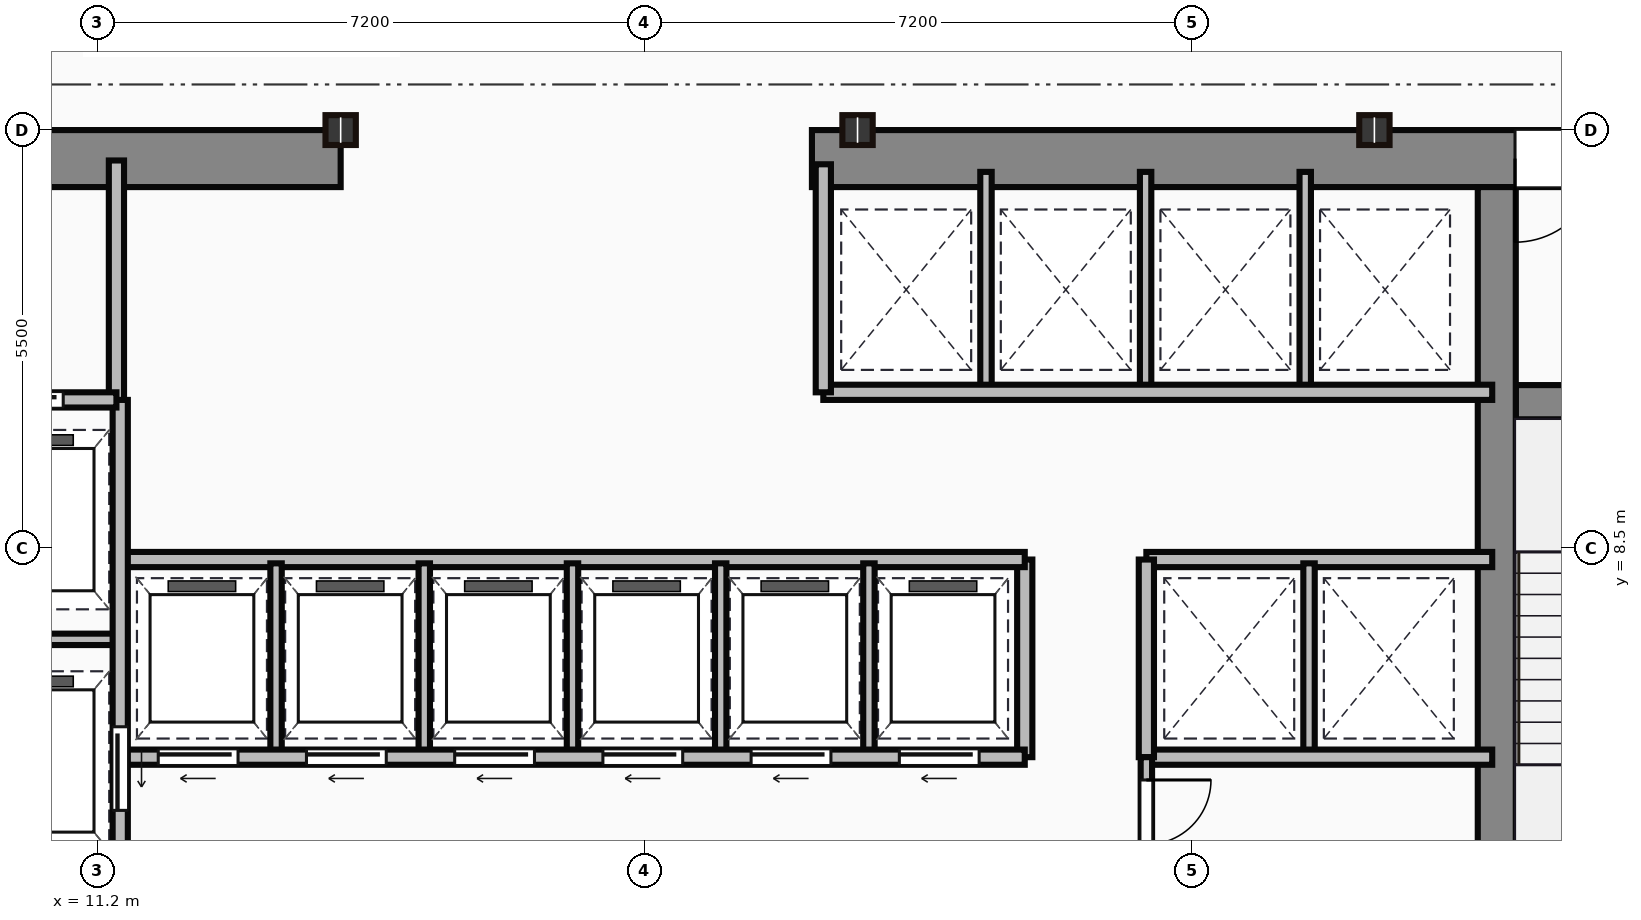
"""IFC4 building model, lengths in metres.
Left out: names, types, materials, properties, quantities, classifications, styles, units other than length and angle.
Written with IfcOpenShell. Run it as: python <this file> out.ifc"""

import sys

from ifc_helpers import new_model, si_unit, direction, frame, frame_2d, origin, origin_2d, place, context, subcontext, project, spatial, rectangle, i_section, extrude, source, transform, mapped, element, fill, save


model = new_model("IFC4")
c1 = context("Model", 3, precision=1e-05, world=origin(), true_north=direction((0.0, 1.0)))
c2 = subcontext(c1, "Body", "Model", "MODEL_VIEW")
j1 = project(units=[si_unit("LENGTHUNIT", "METRE"), si_unit("PLANEANGLEUNIT", "RADIAN")], contexts=[c1])
p1 = place(None, origin())
s1 = spatial("IfcSite", under=j1, at=p1, CompositionType="ELEMENT")
p2 = place(p1, origin())
s2 = spatial("IfcBuilding", under=s1, at=p2, CompositionType="ELEMENT")
p3 = place(p2, frame((0.0, 0.0, 121.5)))
s3 = spatial("IfcBuildingStorey", under=s2, at=p3, CompositionType="ELEMENT", Elevation=121.5)
m1 = source(origin(), c2, "Body", "SweptSolid", [
    extrude(rectangle(XDim=9.1, YDim=0.75, at=frame_2d((4.55, 0.0))), origin(), (0.0, 0.0, 1.0), 3.65),
])
p4 = place(p3, frame((5.3, 13.625, 0.0), z_axis=(0.0, 0.0, 1.0), x_axis=(1.0, 0.0, 0.0)))
e1 = element("IfcWall", 1, at=p4, inside=s3, PredefinedType="SHEAR", context=c2, shape_type="MappedRepresentation", body=[
    mapped(m1, transform((0.0, 0.0, 0.0))),
])
p5 = place(p4, frame((4.1, 0.0, 0.0)))
e2 = element("IfcOpeningElement", 2, at=p5, cuts=e1, PredefinedType="OPENING", context=c2, shape_type="SweptSolid", body=[
    extrude(rectangle(XDim=1.1, YDim=2.15, at=frame_2d((0.55, 1.075))), frame((0.0, 0.385, 0.0), z_axis=(0.0, -1.0, 0.0), x_axis=(1.0, 0.0, 0.0)), (0.0, 0.0, 1.0), 0.77),
])
m2 = source(origin(), c2, "Body", "SweptSolid", [
    extrude(rectangle(XDim=12.6, YDim=0.75, at=frame_2d((6.3, 0.0))), origin(), (0.0, 0.0, 1.0), 3.65),
])
p6 = place(p3, frame((20.6, 13.625, 0.0), z_axis=(0.0, 0.0, 1.0), x_axis=(1.0, 0.0, 0.0)))
e3 = element("IfcWall", 3, at=p6, inside=s3, PredefinedType="SHEAR", context=c2, shape_type="MappedRepresentation", body=[
    mapped(m2, transform((0.0, 0.0, 0.0))),
])
p7 = place(p6, frame((9.25, 0.0, 0.0)))
e4 = element("IfcOpeningElement", 4, at=p7, cuts=e3, PredefinedType="OPENING", context=c2, shape_type="SweptSolid", body=[
    extrude(rectangle(XDim=1.1, YDim=2.15, at=frame_2d((0.55, 1.075))), frame((0.0, 0.385, 0.0), z_axis=(0.0, -1.0, 0.0), x_axis=(1.0, 0.0, 0.0)), (0.0, 0.0, 1.0), 0.77),
])
m3 = source(origin(), c2, "Body", "SweptSolid", [
    extrude(rectangle(XDim=12.35, YDim=0.5, at=frame_2d((6.175, 0.0))), origin(), (0.0, 0.0, 1.0), 3.65),
])
p8 = place(p3, frame((29.61, 0.9, 0.0), z_axis=(0.0, 0.0, 1.0), x_axis=(0.0, 1.0, 0.0)))
e5 = element("IfcWall", 5, at=p8, inside=s3, PredefinedType="SHEAR", context=c2, shape_type="MappedRepresentation", body=[
    mapped(m3, transform((0.0, 0.0, 0.0))),
])
m4 = source(origin(), c2, "Body", "SweptSolid", [
    extrude(rectangle(XDim=3.39, YDim=0.45, at=frame_2d((1.695, 0.0))), origin(), (0.0, 0.0, 1.0), 3.65),
])
p9 = place(p3, frame((29.86, 10.42, 0.0), z_axis=(0.0, 0.0, 1.0), x_axis=(1.0, 0.0, 0.0)))
e6 = element("IfcWall", 6, at=p9, inside=s3, PredefinedType="SHEAR", context=c2, shape_type="MappedRepresentation", body=[
    mapped(m4, transform((0.0, 0.0, 0.0))),
])
p10 = place(p9, frame((1.1, 0.0, 0.0)))
e7 = element("IfcOpeningElement", 7, at=p10, cuts=e6, PredefinedType="OPENING", context=c2, shape_type="SweptSolid", body=[
    extrude(rectangle(XDim=1.1, YDim=2.15, at=frame_2d((0.55, 1.075))), frame((0.0, 0.235, 0.0), z_axis=(0.0, -1.0, 0.0), x_axis=(1.0, 0.0, 0.0)), (0.0, 0.0, 1.0), 0.47),
])
m5 = source(origin(), c2, "Body", "SweptSolid", [
    extrude(i_section(OverallWidth=0.399, OverallDepth=0.393, WebThickness=0.023, FlangeThickness=0.037, at=origin_2d()), origin(), (0.0, 0.0, 1.0), 3.65),
])
for number, where, z_axis, x_axis in (
    (8, (14.4, 14.0, 0.0), (0.0, 0.0, 1.0), (1.0, 0.0, 0.0)),
    (9, (21.2, 14.0, 0.0), (0.0, 0.0, 1.0), (1.0, 0.0, 0.0)),
    (10, (28.0, 14.0, 0.0), (0.0, 0.0, 1.0), (1.0, 0.0, 0.0)),
):
    element("IfcColumn", number, at=place(p3, frame(where, z_axis=z_axis, x_axis=x_axis)), inside=s3, PredefinedType="COLUMN", context=c2, shape_type="MappedRepresentation", body=[
        mapped(m5, transform((0.0, 0.0, 0.0))),
    ])
m6 = source(origin(), c2, "Body", "SweptSolid", [
    extrude(rectangle(XDim=3.18, YDim=0.2, at=frame_2d((1.59, 0.0))), origin(), (0.0, 0.0, 1.0), 3.4),
])
p11 = place(p3, frame((11.45, 10.42, 0.0), z_axis=(0.0, 0.0, 1.0), x_axis=(0.0, 1.0, 0.0)))
e11 = element("IfcWall", 11, at=p11, inside=s3, PredefinedType="PARTITIONING", context=c2, shape_type="MappedRepresentation", body=[
    mapped(m6, transform((0.0, 0.0, 0.0))),
])
m7 = source(origin(), c2, "Body", "SweptSolid", [
    extrude(rectangle(XDim=2.35, YDim=0.2, at=frame_2d((1.175, 0.0))), origin(), (0.0, 0.0, 1.0), 3.4),
])
p12 = place(p3, frame((9.1, 10.45, 0.0), z_axis=(0.0, 0.0, 1.0), x_axis=(1.0, 0.0, 0.0)))
e12 = element("IfcWall", 12, at=p12, inside=s3, PredefinedType="PARTITIONING", context=c2, shape_type="MappedRepresentation", body=[
    mapped(m7, transform((0.0, 0.0, 0.0))),
])
p13 = place(p12, frame((0.55, 0.0, 0.0)))
e13 = element("IfcOpeningElement", 13, at=p13, cuts=e12, PredefinedType="OPENING", context=c2, shape_type="SweptSolid", body=[
    extrude(rectangle(XDim=1.1, YDim=2.15, at=frame_2d((0.55, 1.075))), frame((0.0, 0.11, 0.0), z_axis=(0.0, -1.0, 0.0), x_axis=(1.0, 0.0, 0.0)), (0.0, 0.0, 1.0), 0.22),
])
m8 = source(origin(), c2, "Body", "SweptSolid", [
    extrude(rectangle(XDim=9.6, YDim=0.2, at=frame_2d((4.8, 0.0))), origin(), (0.0, 0.0, 1.0), 3.4),
])
p14 = place(p3, frame((11.5, 0.85, 0.0), z_axis=(0.0, 0.0, 1.0), x_axis=(0.0, 1.0, 0.0)))
e14 = element("IfcWall", 14, at=p14, inside=s3, PredefinedType="PARTITIONING", context=c2, shape_type="MappedRepresentation", body=[
    mapped(m8, transform((0.0, 0.0, 0.0))),
])
p15 = place(p14, frame((4.2, 0.0, 0.0)))
e15 = element("IfcOpeningElement", 15, at=p15, cuts=e14, PredefinedType="OPENING", context=c2, shape_type="SweptSolid", body=[
    extrude(rectangle(XDim=1.1, YDim=2.15, at=frame_2d((0.55, 1.075))), frame((0.0, 0.11, 0.0), z_axis=(0.0, -1.0, 0.0), x_axis=(1.0, 0.0, 0.0)), (0.0, 0.0, 1.0), 0.22),
])
p16 = place(p14, frame((0.9, 0.0, 0.0)))
e16 = element("IfcOpeningElement", 16, at=p16, cuts=e14, PredefinedType="OPENING", context=c2, shape_type="SweptSolid", body=[
    extrude(rectangle(XDim=1.2, YDim=2.15, at=frame_2d((0.6, 1.075))), frame((0.0, 0.11, 0.0), z_axis=(0.0, -1.0, 0.0), x_axis=(1.0, 0.0, 0.0)), (0.0, 0.0, 1.0), 0.22),
])
m9 = source(origin(), c2, "Body", "SweptSolid", [
    extrude(rectangle(XDim=2.4, YDim=0.15, at=frame_2d((1.2, 0.0))), origin(), (0.0, 0.0, 1.0), 3.4),
])
p17 = place(p3, frame((9.1, 7.3, 0.0), z_axis=(0.0, 0.0, 1.0), x_axis=(1.0, 0.0, 0.0)))
e17 = element("IfcWall", 17, at=p17, inside=s3, PredefinedType="PARTITIONING", context=c2, shape_type="MappedRepresentation", body=[
    mapped(m9, transform((0.0, 0.0, 0.0))),
])
m10 = source(origin(), c2, "Body", "SweptSolid", [
    extrude(rectangle(XDim=11.85, YDim=0.2, at=frame_2d((5.925, 0.0))), origin(), (0.0, 0.0, 1.0), 3.4),
])
p18 = place(p3, frame((11.55, 5.75, 0.0), z_axis=(0.0, 0.0, 1.0), x_axis=(1.0, 0.0, 0.0)))
e18 = element("IfcWall", 18, at=p18, inside=s3, PredefinedType="PARTITIONING", context=c2, shape_type="MappedRepresentation", body=[
    mapped(m10, transform((0.0, 0.0, 0.0))),
])
p19 = place(p18, frame((0.45, 0.0, 0.0)))
e19 = element("IfcOpeningElement", 19, at=p19, cuts=e18, PredefinedType="OPENING", context=c2, shape_type="SweptSolid", body=[
    extrude(rectangle(XDim=1.05, YDim=2.15, at=frame_2d((0.525, 1.075))), frame((0.0, 0.11, 0.0), z_axis=(0.0, -1.0, 0.0), x_axis=(1.0, 0.0, 0.0)), (0.0, 0.0, 1.0), 0.22),
])
p20 = place(p18, frame((2.4, 0.0, 0.0)))
e20 = element("IfcOpeningElement", 20, at=p20, cuts=e18, PredefinedType="OPENING", context=c2, shape_type="SweptSolid", body=[
    extrude(rectangle(XDim=1.05, YDim=2.15, at=frame_2d((0.525, 1.075))), frame((0.0, 0.11, 0.0), z_axis=(0.0, -1.0, 0.0), x_axis=(1.0, 0.0, 0.0)), (0.0, 0.0, 1.0), 0.22),
])
p21 = place(p18, frame((4.35, 0.0, 0.0)))
e21 = element("IfcOpeningElement", 21, at=p21, cuts=e18, PredefinedType="OPENING", context=c2, shape_type="SweptSolid", body=[
    extrude(rectangle(XDim=1.05, YDim=2.15, at=frame_2d((0.525, 1.075))), frame((0.0, 0.11, 0.0), z_axis=(0.0, -1.0, 0.0), x_axis=(1.0, 0.0, 0.0)), (0.0, 0.0, 1.0), 0.22),
])
p22 = place(p18, frame((6.3, 0.0, 0.0)))
e22 = element("IfcOpeningElement", 22, at=p22, cuts=e18, PredefinedType="OPENING", context=c2, shape_type="SweptSolid", body=[
    extrude(rectangle(XDim=1.05, YDim=2.15, at=frame_2d((0.525, 1.075))), frame((0.0, 0.11, 0.0), z_axis=(0.0, -1.0, 0.0), x_axis=(1.0, 0.0, 0.0)), (0.0, 0.0, 1.0), 0.22),
])
p23 = place(p18, frame((8.25, 0.0, 0.0)))
e23 = element("IfcOpeningElement", 23, at=p23, cuts=e18, PredefinedType="OPENING", context=c2, shape_type="SweptSolid", body=[
    extrude(rectangle(XDim=1.05, YDim=2.15, at=frame_2d((0.525, 1.075))), frame((0.0, 0.11, 0.0), z_axis=(0.0, -1.0, 0.0), x_axis=(1.0, 0.0, 0.0)), (0.0, 0.0, 1.0), 0.22),
])
p24 = place(p18, frame((10.2, 0.0, 0.0)))
e24 = element("IfcOpeningElement", 24, at=p24, cuts=e18, PredefinedType="OPENING", context=c2, shape_type="SweptSolid", body=[
    extrude(rectangle(XDim=1.05, YDim=2.15, at=frame_2d((0.525, 1.075))), frame((0.0, 0.11, 0.0), z_axis=(0.0, -1.0, 0.0), x_axis=(1.0, 0.0, 0.0)), (0.0, 0.0, 1.0), 0.22),
])
p25 = place(p3, frame((11.55, 8.35, 0.0), z_axis=(0.0, 0.0, 1.0), x_axis=(1.0, 0.0, 0.0)))
e25 = element("IfcWall", 25, at=p25, inside=s3, PredefinedType="PARTITIONING", context=c2, shape_type="MappedRepresentation", body=[
    mapped(m10, transform((0.0, 0.0, 0.0))),
])
m11 = source(origin(), c2, "Body", "SweptSolid", [
    extrude(rectangle(XDim=2.6, YDim=0.2, at=frame_2d((1.3, 0.0))), origin(), (0.0, 0.0, 1.0), 3.4),
])
p26 = place(p3, frame((23.4, 5.75, 0.0), z_axis=(0.0, 0.0, 1.0), x_axis=(0.0, 1.0, 0.0)))
e26 = element("IfcWall", 26, at=p26, inside=s3, PredefinedType="PARTITIONING", context=c2, shape_type="MappedRepresentation", body=[
    mapped(m11, transform((0.0, 0.0, 0.0))),
])
m12 = source(origin(), c2, "Body", "SweptSolid", [
    extrude(rectangle(XDim=2.5, YDim=0.15, at=frame_2d((1.25, 0.0))), origin(), (0.0, 0.0, 1.0), 3.4),
])
for number, where, z_axis, x_axis in (
    (27, (13.55, 5.8, 0.0), (0.0, 0.0, 1.0), (0.0, 1.0, 0.0)),
    (28, (15.5, 5.8, 0.0), (0.0, 0.0, 1.0), (0.0, 1.0, 0.0)),
    (29, (17.45, 5.8, 0.0), (0.0, 0.0, 1.0), (0.0, 1.0, 0.0)),
    (30, (19.4, 5.8, 0.0), (0.0, 0.0, 1.0), (0.0, 1.0, 0.0)),
    (31, (21.35, 5.8, 0.0), (0.0, 0.0, 1.0), (0.0, 1.0, 0.0)),
):
    element("IfcWall", number, at=place(p3, frame(where, z_axis=z_axis, x_axis=x_axis)), inside=s3, PredefinedType="PARTITIONING", context=c2, shape_type="MappedRepresentation", body=[
        mapped(m12, transform((0.0, 0.0, 0.0))),
    ])
m13 = source(origin(), c2, "Body", "SweptSolid", [
    extrude(rectangle(XDim=8.8, YDim=0.2, at=frame_2d((4.4, 0.0))), origin(), (0.0, 0.0, 1.0), 3.4),
])
p27 = place(p3, frame((20.75, 10.55, 0.0), z_axis=(0.0, 0.0, 1.0), x_axis=(1.0, 0.0, 0.0)))
e32 = element("IfcWall", 32, at=p27, inside=s3, PredefinedType="PARTITIONING", context=c2, shape_type="MappedRepresentation", body=[
    mapped(m13, transform((0.0, 0.0, 0.0))),
])
m14 = source(origin(), c2, "Body", "SweptSolid", [
    extrude(rectangle(XDim=3.0, YDim=0.2, at=frame_2d((1.5, 0.0))), origin(), (0.0, 0.0, 1.0), 3.4),
])
p28 = place(p3, frame((20.75, 10.55, 0.0), z_axis=(0.0, 0.0, 1.0), x_axis=(0.0, 1.0, 0.0)))
e33 = element("IfcWall", 33, at=p28, inside=s3, PredefinedType="PARTITIONING", context=c2, shape_type="MappedRepresentation", body=[
    mapped(m14, transform((0.0, 0.0, 0.0))),
])
m15 = source(origin(), c2, "Body", "SweptSolid", [
    extrude(rectangle(XDim=2.85, YDim=0.15, at=frame_2d((1.425, 0.0))), origin(), (0.0, 0.0, 1.0), 3.4),
])
for number, where, z_axis, x_axis in (
    (34, (22.89, 10.6, 0.0), (0.0, 0.0, 1.0), (0.0, 1.0, 0.0)),
    (35, (24.99, 10.6, 0.0), (0.0, 0.0, 1.0), (0.0, 1.0, 0.0)),
    (36, (27.09, 10.6, 0.0), (0.0, 0.0, 1.0), (0.0, 1.0, 0.0)),
):
    element("IfcWall", number, at=place(p3, frame(where, z_axis=z_axis, x_axis=x_axis)), inside=s3, PredefinedType="PARTITIONING", context=c2, shape_type="MappedRepresentation", body=[
        mapped(m15, transform((0.0, 0.0, 0.0))),
    ])
m16 = source(origin(), c2, "Body", "SweptSolid", [
    extrude(rectangle(XDim=4.55, YDim=0.2, at=frame_2d((2.275, 0.0))), origin(), (0.0, 0.0, 1.0), 3.4),
])
for number, where, z_axis, x_axis in (
    (37, (25.0, 8.35, 0.0), (0.0, 0.0, 1.0), (1.0, 0.0, 0.0)),
    (38, (25.0, 5.75, 0.0), (0.0, 0.0, 1.0), (1.0, 0.0, 0.0)),
):
    element("IfcWall", number, at=place(p3, frame(where, z_axis=z_axis, x_axis=x_axis)), inside=s3, PredefinedType="PARTITIONING", context=c2, shape_type="MappedRepresentation", body=[
        mapped(m16, transform((0.0, 0.0, 0.0))),
    ])
p29 = place(p3, frame((25.0, 5.75, 0.0), z_axis=(0.0, 0.0, 1.0), x_axis=(0.0, 1.0, 0.0)))
e39 = element("IfcWall", 39, at=p29, inside=s3, PredefinedType="PARTITIONING", context=c2, shape_type="MappedRepresentation", body=[
    mapped(m11, transform((0.0, 0.0, 0.0))),
])
p30 = place(p3, frame((27.14, 5.8, 0.0), z_axis=(0.0, 0.0, 1.0), x_axis=(0.0, 1.0, 0.0)))
e40 = element("IfcWall", 40, at=p30, inside=s3, PredefinedType="PARTITIONING", context=c2, shape_type="MappedRepresentation", body=[
    mapped(m12, transform((0.0, 0.0, 0.0))),
])
m17 = source(origin(), c2, "Body", "SweptSolid", [
    extrude(rectangle(XDim=4.9, YDim=0.15, at=frame_2d((2.45, 0.0))), origin(), (0.0, 0.0, 1.0), 3.4),
])
p31 = place(p3, frame((25.0, 0.85, 0.0), z_axis=(0.0, 0.0, 1.0), x_axis=(0.0, 1.0, 0.0)))
e41 = element("IfcWall", 41, at=p31, inside=s3, PredefinedType="PARTITIONING", context=c2, shape_type="MappedRepresentation", body=[
    mapped(m17, transform((0.0, 0.0, 0.0))),
])
p32 = place(p31, frame((2.0, 0.0, 0.0)))
e42 = element("IfcOpeningElement", 42, at=p32, cuts=e41, PredefinedType="OPENING", context=c2, shape_type="SweptSolid", body=[
    extrude(rectangle(XDim=0.95, YDim=2.15, at=frame_2d((0.475, 1.075))), frame((0.0, 0.085, 0.0), z_axis=(0.0, -1.0, 0.0), x_axis=(1.0, 0.0, 0.0)), (0.0, 0.0, 1.0), 0.17),
])
p33 = place(p31, frame((3.75, 0.0, 0.0)))
e43 = element("IfcOpeningElement", 43, at=p33, cuts=e41, PredefinedType="OPENING", context=c2, shape_type="SweptSolid", body=[
    extrude(rectangle(XDim=0.85, YDim=2.15, at=frame_2d((0.425, 1.075))), frame((0.0, 0.085, 0.0), z_axis=(0.0, -1.0, 0.0), x_axis=(1.0, 0.0, 0.0)), (0.0, 0.0, 1.0), 0.17),
])
m18 = source(origin(), c2, "Body", "SweptSolid", [
    extrude(rectangle(XDim=1.1, YDim=2.15, at=frame_2d((0.55, 1.075))), frame((0.0, 0.025, 0.0), z_axis=(0.0, -1.0, 0.0), x_axis=(1.0, 0.0, 0.0)), (0.0, 0.0, 1.0), 0.05),
])
p34 = place(p7, origin())
e44 = element("IfcDoor", 44, at=p34, inside=s3, OperationType="SINGLE_SWING_LEFT", PredefinedType="DOOR", context=c2, shape_type="MappedRepresentation", body=[
    mapped(m18, transform((0.0, 0.0, 0.0))),
])
fill(e4, e44)
p35 = place(p13, origin())
e45 = element("IfcDoor", 45, at=p35, inside=s3, OperationType="SLIDING_TO_LEFT", PredefinedType="DOOR", context=c2, shape_type="MappedRepresentation", body=[
    mapped(m18, transform((0.0, 0.0, 0.0))),
])
fill(e13, e45)
p36 = place(p15, frame((1.1, 0.0, 0.0), z_axis=(0.0, 0.0, 1.0), x_axis=(-1.0, 0.0, 0.0)))
e46 = element("IfcDoor", 46, at=p36, inside=s3, OperationType="SLIDING_TO_LEFT", PredefinedType="DOOR", context=c2, shape_type="MappedRepresentation", body=[
    mapped(m18, transform((0.0, 0.0, 0.0))),
])
fill(e15, e46)
m19 = source(origin(), c2, "Body", "SweptSolid", [
    extrude(rectangle(XDim=1.05, YDim=2.15, at=frame_2d((0.525, 1.075))), frame((0.0, 0.025, 0.0), z_axis=(0.0, -1.0, 0.0), x_axis=(1.0, 0.0, 0.0)), (0.0, 0.0, 1.0), 0.05),
])
p37 = place(p19, frame((1.05, 0.0, 0.0), z_axis=(0.0, 0.0, 1.0), x_axis=(-1.0, 0.0, 0.0)))
e47 = element("IfcDoor", 47, at=p37, inside=s3, OperationType="SLIDING_TO_LEFT", PredefinedType="DOOR", context=c2, shape_type="MappedRepresentation", body=[
    mapped(m19, transform((0.0, 0.0, 0.0))),
])
fill(e19, e47)
p38 = place(p20, frame((1.05, 0.0, 0.0), z_axis=(0.0, 0.0, 1.0), x_axis=(-1.0, 0.0, 0.0)))
e48 = element("IfcDoor", 48, at=p38, inside=s3, OperationType="SLIDING_TO_LEFT", PredefinedType="DOOR", context=c2, shape_type="MappedRepresentation", body=[
    mapped(m19, transform((0.0, 0.0, 0.0))),
])
fill(e20, e48)
p39 = place(p21, frame((1.05, 0.0, 0.0), z_axis=(0.0, 0.0, 1.0), x_axis=(-1.0, 0.0, 0.0)))
e49 = element("IfcDoor", 49, at=p39, inside=s3, OperationType="SLIDING_TO_LEFT", PredefinedType="DOOR", context=c2, shape_type="MappedRepresentation", body=[
    mapped(m19, transform((0.0, 0.0, 0.0))),
])
fill(e21, e49)
p40 = place(p22, frame((1.05, 0.0, 0.0), z_axis=(0.0, 0.0, 1.0), x_axis=(-1.0, 0.0, 0.0)))
e50 = element("IfcDoor", 50, at=p40, inside=s3, OperationType="SLIDING_TO_LEFT", PredefinedType="DOOR", context=c2, shape_type="MappedRepresentation", body=[
    mapped(m19, transform((0.0, 0.0, 0.0))),
])
fill(e22, e50)
p41 = place(p23, frame((1.05, 0.0, 0.0), z_axis=(0.0, 0.0, 1.0), x_axis=(-1.0, 0.0, 0.0)))
e51 = element("IfcDoor", 51, at=p41, inside=s3, OperationType="SLIDING_TO_LEFT", PredefinedType="DOOR", context=c2, shape_type="MappedRepresentation", body=[
    mapped(m19, transform((0.0, 0.0, 0.0))),
])
fill(e23, e51)
p42 = place(p24, frame((1.05, 0.0, 0.0), z_axis=(0.0, 0.0, 1.0), x_axis=(-1.0, 0.0, 0.0)))
e52 = element("IfcDoor", 52, at=p42, inside=s3, OperationType="SLIDING_TO_LEFT", PredefinedType="DOOR", context=c2, shape_type="MappedRepresentation", body=[
    mapped(m19, transform((0.0, 0.0, 0.0))),
])
fill(e24, e52)
m20 = source(origin(), c2, "Body", "SweptSolid", [
    extrude(rectangle(XDim=0.85, YDim=2.15, at=frame_2d((0.425, 1.075))), frame((0.0, 0.025, 0.0), z_axis=(0.0, -1.0, 0.0), x_axis=(1.0, 0.0, 0.0)), (0.0, 0.0, 1.0), 0.05),
])
p43 = place(p33, origin())
e53 = element("IfcDoor", 53, at=p43, inside=s3, OperationType="SINGLE_SWING_RIGHT", PredefinedType="DOOR", context=c2, shape_type="MappedRepresentation", body=[
    mapped(m20, transform((0.0, 0.0, 0.0))),
])
fill(e43, e53)
save(model, sys.argv[1])
